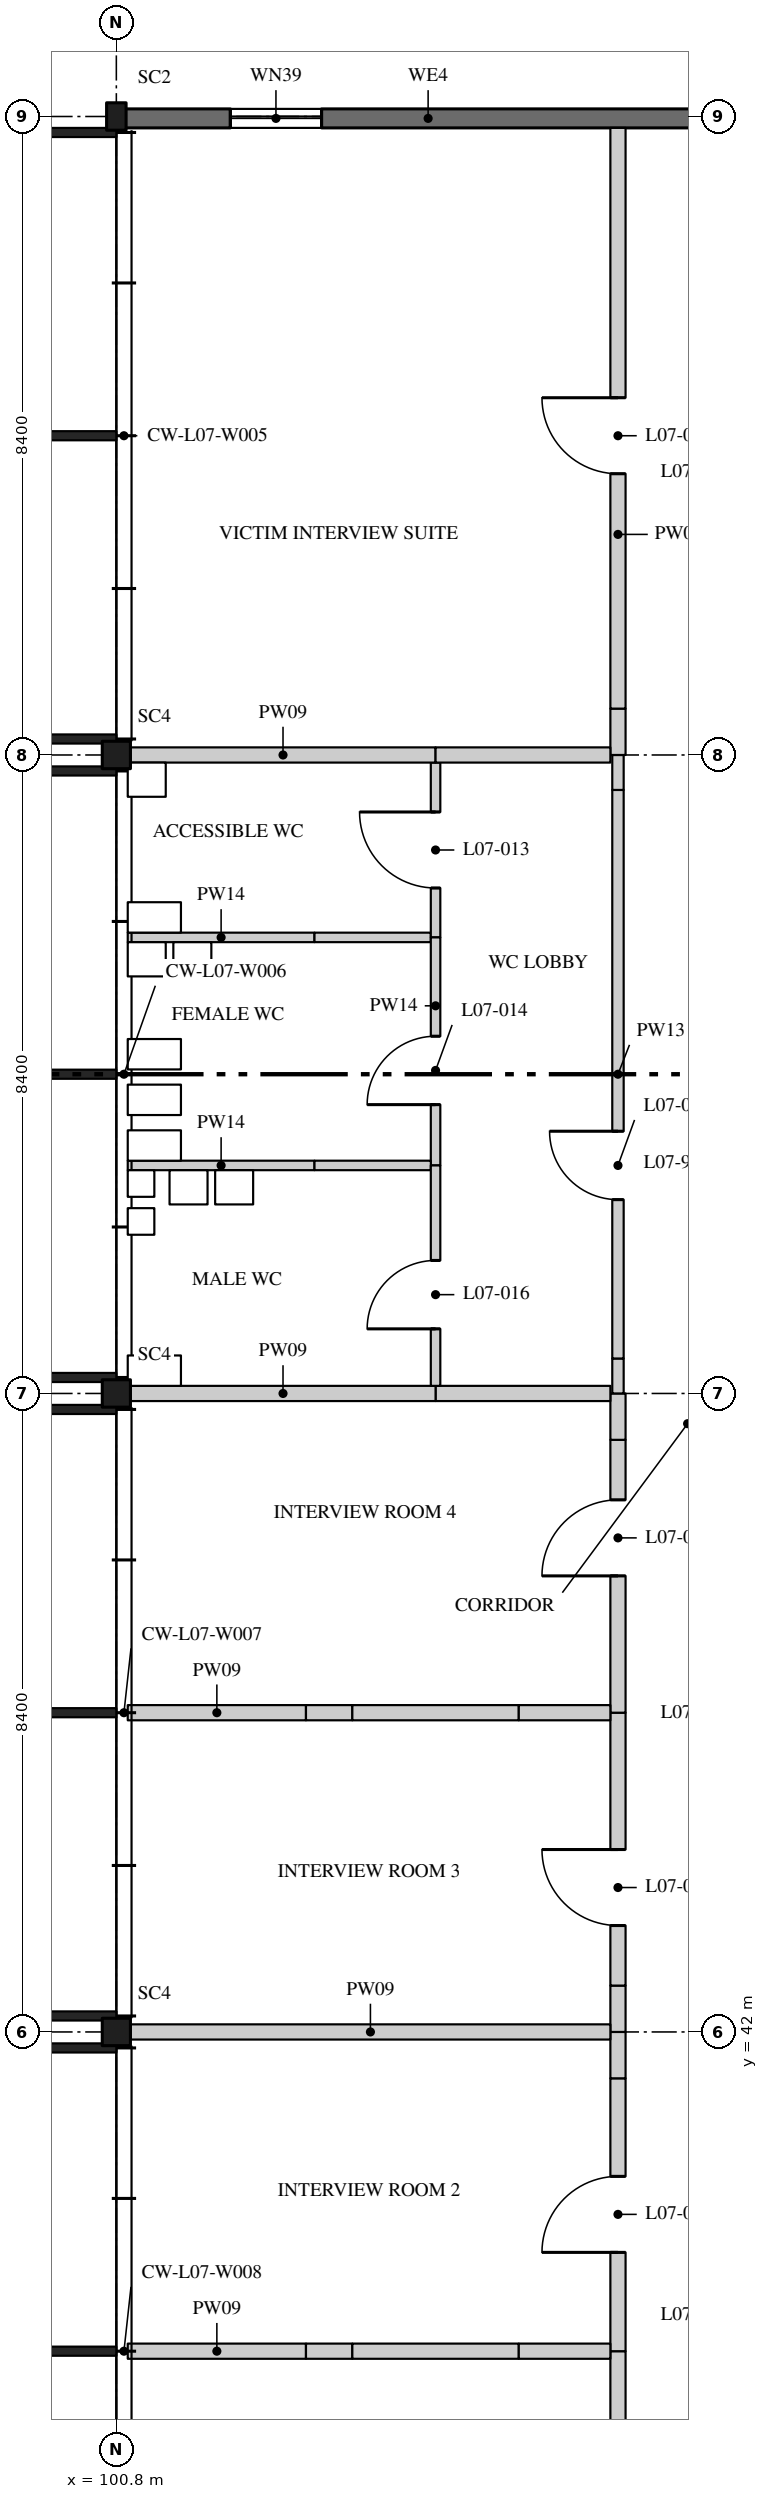
"""IFC4 building model, lengths in metres.
Left out: names, types, materials, properties, quantities, classifications, styles, units other than length and angle.
Written with IfcOpenShell. Run it as: python <this file> out.ifc"""

import sys

from ifc_helpers import new_model, si_unit, direction, frame, frame_2d, origin, origin_2d, place, context, subcontext, project, spatial, rectangle, i_section, extrude, element, fill, save


model = new_model("IFC4")
c1 = context("Model", 3, precision=1e-05, world=origin(), true_north=direction((0.0, 1.0)))
c2 = subcontext(c1, "Body", "Model", "MODEL_VIEW")
j1 = project(units=[si_unit("LENGTHUNIT", "METRE"), si_unit("PLANEANGLEUNIT", "RADIAN")], contexts=[c1])
p1 = place(None, origin())
s1 = spatial("IfcSite", under=j1, at=p1, CompositionType="ELEMENT")
p2 = place(p1, origin())
s2 = spatial("IfcBuilding", under=s1, at=p2, CompositionType="ELEMENT")
p3 = place(p2, frame((0.0, 0.0, 32.4)))
s3 = spatial("IfcBuildingStorey", under=s2, at=p3, CompositionType="ELEMENT", Elevation=32.4)
for number, where, z_axis, x_axis in (
    (1, (100.8, 42.0, 0.0), (0.0, 0.0, 1.0), (1.0, 0.0, 0.0)),
    (2, (100.8, 50.4, 0.0), (0.0, 0.0, 1.0), (1.0, 0.0, 0.0)),
    (3, (100.8, 58.8, 0.0), (0.0, 0.0, 1.0), (1.0, 0.0, 0.0)),
):
    element("IfcColumn", number, at=place(p3, frame(where, z_axis=z_axis, x_axis=x_axis)), inside=s3, PredefinedType="COLUMN", context=c2, shape_type="SweptSolid", body=[
        extrude(i_section(OverallWidth=0.371, OverallDepth=0.361, WebThickness=0.012, FlangeThickness=0.02, FilletRadius=0.015, at=origin_2d()), origin(), (0.0, 0.0, 1.0), 4.37),
    ])
p4 = place(p3, frame((100.8, 67.2, 0.0), z_axis=(0.0, 0.0, 1.0), x_axis=(1.0, 0.0, 0.0)))
e4 = element("IfcColumn", 4, at=p4, inside=s3, PredefinedType="COLUMN", context=c2, shape_type="SweptSolid", body=[
    extrude(i_section(OverallWidth=0.257, OverallDepth=0.361, WebThickness=0.011, FlangeThickness=0.02, FilletRadius=0.015, at=origin_2d()), origin(), (0.0, 0.0, 1.0), 4.37),
])
p5 = place(p3, frame((107.4, 33.75, 0.0), z_axis=(0.0, 0.0, 1.0), x_axis=(0.0, 1.0, 0.0)))
e5 = element("IfcWall", 5, at=p5, inside=s3, PredefinedType="PARTITIONING", context=c2, shape_type="SweptSolid", body=[
    extrude(rectangle(XDim=4.05, YDim=0.2, at=frame_2d((2.025, 0.0))), origin(), (0.0, 0.0, 1.0), 4.37),
])
p6 = place(p5, frame((1.25, 0.0, 0.0)))
e6 = element("IfcOpeningElement", 6, at=p6, cuts=e5, PredefinedType="OPENING", context=c2, shape_type="SweptSolid", body=[
    extrude(rectangle(XDim=1.0, YDim=2.1, at=frame_2d((0.5, 1.05))), frame((0.0, 0.11, 0.0), z_axis=(0.0, -1.0, 0.0), x_axis=(1.0, 0.0, 0.0)), (0.0, 0.0, 1.0), 0.22),
])
p7 = place(p3, frame((107.4, 37.8, 0.0), z_axis=(0.0, 0.0, 1.0), x_axis=(0.0, 1.0, 0.0)))
e7 = element("IfcWall", 7, at=p7, inside=s3, PredefinedType="PARTITIONING", context=c2, shape_type="SweptSolid", body=[
    extrude(rectangle(XDim=3.59, YDim=0.2, at=frame_2d((1.795, 0.0))), origin(), (0.0, 0.0, 1.0), 4.37),
])
p8 = place(p7, frame((1.3, 0.0, 0.0)))
e8 = element("IfcOpeningElement", 8, at=p8, cuts=e7, PredefinedType="OPENING", context=c2, shape_type="SweptSolid", body=[
    extrude(rectangle(XDim=1.0, YDim=2.1, at=frame_2d((0.5, 1.05))), frame((0.0, 0.11, 0.0), z_axis=(0.0, -1.0, 0.0), x_axis=(1.0, 0.0, 0.0)), (0.0, 0.0, 1.0), 0.22),
])
for number, where, z_axis, x_axis in (
    (9, (107.4, 41.39, 0.0), (0.0, 0.0, 1.0), (0.0, 1.0, 0.0)),
    (10, (107.4, 42.0, 0.0), (0.0, 0.0, 1.0), (0.0, 1.0, 0.0)),
):
    element("IfcWall", number, at=place(p3, frame(where, z_axis=z_axis, x_axis=x_axis)), inside=s3, PredefinedType="PARTITIONING", context=c2, shape_type="SweptSolid", body=[
        extrude(rectangle(XDim=0.61, YDim=0.2, at=frame_2d((0.305, 0.0))), origin(), (0.0, 0.0, 1.0), 3.746),
    ])
p9 = place(p3, frame((107.4, 42.61, 0.0), z_axis=(0.0, 0.0, 1.0), x_axis=(0.0, 1.0, 0.0)))
e11 = element("IfcWall", 11, at=p9, inside=s3, PredefinedType="PARTITIONING", context=c2, shape_type="SweptSolid", body=[
    extrude(rectangle(XDim=3.59, YDim=0.2, at=frame_2d((1.795, 0.0))), origin(), (0.0, 0.0, 1.0), 4.37),
])
p10 = place(p9, frame((0.79, 0.0, 0.0)))
e12 = element("IfcOpeningElement", 12, at=p10, cuts=e11, PredefinedType="OPENING", context=c2, shape_type="SweptSolid", body=[
    extrude(rectangle(XDim=1.0, YDim=2.1, at=frame_2d((0.5, 1.05))), frame((0.0, 0.11, 0.0), z_axis=(0.0, -1.0, 0.0), x_axis=(1.0, 0.0, 0.0)), (0.0, 0.0, 1.0), 0.22),
])
p11 = place(p3, frame((107.4, 46.2, 0.0), z_axis=(0.0, 0.0, 1.0), x_axis=(0.0, 1.0, 0.0)))
e13 = element("IfcWall", 13, at=p11, inside=s3, PredefinedType="PARTITIONING", context=c2, shape_type="SweptSolid", body=[
    extrude(rectangle(XDim=3.59, YDim=0.2, at=frame_2d((1.795, 0.0))), origin(), (0.0, 0.0, 1.0), 4.37),
])
p12 = place(p11, frame((1.8, 0.0, 0.0)))
e14 = element("IfcOpeningElement", 14, at=p12, cuts=e13, PredefinedType="OPENING", context=c2, shape_type="SweptSolid", body=[
    extrude(rectangle(XDim=1.0, YDim=2.1, at=frame_2d((0.5, 1.05))), frame((0.0, 0.11, 0.0), z_axis=(0.0, -1.0, 0.0), x_axis=(1.0, 0.0, 0.0)), (0.0, 0.0, 1.0), 0.22),
])
p13 = place(p3, frame((107.4, 49.79, 0.0), z_axis=(0.0, 0.0, 1.0), x_axis=(0.0, 1.0, 0.0)))
e15 = element("IfcWall", 15, at=p13, inside=s3, PredefinedType="PARTITIONING", context=c2, shape_type="SweptSolid", body=[
    extrude(rectangle(XDim=0.61, YDim=0.2, at=frame_2d((0.305, 0.0))), origin(), (0.0, 0.0, 1.0), 3.746),
])
p14 = place(p3, frame((107.4, 50.4, 0.0), z_axis=(0.0, 0.0, 1.0), x_axis=(0.0, 1.0, 0.0)))
e16 = element("IfcWall", 16, at=p14, inside=s3, PredefinedType="PARTITIONING", context=c2, shape_type="SweptSolid", body=[
    extrude(rectangle(XDim=0.46, YDim=0.15, at=frame_2d((0.23, 0.0))), origin(), (0.0, 0.0, 1.0), 3.746),
])
p15 = place(p3, frame((107.4, 50.86, 0.0), z_axis=(0.0, 0.0, 1.0), x_axis=(0.0, 1.0, 0.0)))
e17 = element("IfcWall", 17, at=p15, inside=s3, PredefinedType="PARTITIONING", context=c2, shape_type="SweptSolid", body=[
    extrude(rectangle(XDim=7.48, YDim=0.15, at=frame_2d((3.74, 0.0))), origin(), (0.0, 0.0, 1.0), 4.37),
])
p16 = place(p15, frame((2.09, 0.0, 0.0)))
e18 = element("IfcOpeningElement", 18, at=p16, cuts=e17, PredefinedType="OPENING", context=c2, shape_type="SweptSolid", body=[
    extrude(rectangle(XDim=0.9, YDim=2.1, at=frame_2d((0.45, 1.05))), frame((0.0, 0.085, 0.0), z_axis=(0.0, -1.0, 0.0), x_axis=(1.0, 0.0, 0.0)), (0.0, 0.0, 1.0), 0.17),
])
p17 = place(p3, frame((107.4, 58.34, 0.0), z_axis=(0.0, 0.0, 1.0), x_axis=(0.0, 1.0, 0.0)))
e19 = element("IfcWall", 19, at=p17, inside=s3, PredefinedType="PARTITIONING", context=c2, shape_type="SweptSolid", body=[
    extrude(rectangle(XDim=0.46, YDim=0.15, at=frame_2d((0.23, 0.0))), origin(), (0.0, 0.0, 1.0), 3.746),
])
p18 = place(p3, frame((107.4, 58.8, 0.0), z_axis=(0.0, 0.0, 1.0), x_axis=(0.0, 1.0, 0.0)))
e20 = element("IfcWall", 20, at=p18, inside=s3, PredefinedType="PARTITIONING", context=c2, shape_type="SweptSolid", body=[
    extrude(rectangle(XDim=0.61, YDim=0.2, at=frame_2d((0.305, 0.0))), origin(), (0.0, 0.0, 1.0), 3.746),
])
p19 = place(p3, frame((107.4, 59.41, 0.0), z_axis=(0.0, 0.0, 1.0), x_axis=(0.0, 1.0, 0.0)))
e21 = element("IfcWall", 21, at=p19, inside=s3, PredefinedType="PARTITIONING", context=c2, shape_type="SweptSolid", body=[
    extrude(rectangle(XDim=7.64, YDim=0.2, at=frame_2d((3.82, 0.0))), origin(), (0.0, 0.0, 1.0), 4.37),
])
p20 = place(p19, frame((3.09, 0.0, 0.0)))
e22 = element("IfcOpeningElement", 22, at=p20, cuts=e21, PredefinedType="OPENING", context=c2, shape_type="SweptSolid", body=[
    extrude(rectangle(XDim=1.0, YDim=2.1, at=frame_2d((0.5, 1.05))), frame((0.0, 0.11, 0.0), z_axis=(0.0, -1.0, 0.0), x_axis=(1.0, 0.0, 0.0)), (0.0, 0.0, 1.0), 0.22),
])
p21 = place(p3, frame((100.95, 37.8, 0.0), z_axis=(0.0, 0.0, 1.0), x_axis=(1.0, 0.0, 0.0)))
e23 = element("IfcWall", 23, at=p21, inside=s3, PredefinedType="PARTITIONING", context=c2, shape_type="SweptSolid", body=[
    extrude(rectangle(XDim=2.345, YDim=0.2, at=frame_2d((1.172, 0.0))), origin(), (0.0, 0.0, 1.0), 4.37),
])
p22 = place(p3, frame((103.295, 37.8, 0.0), z_axis=(0.0, 0.0, 1.0), x_axis=(1.0, 0.0, 0.0)))
e24 = element("IfcWall", 24, at=p22, inside=s3, PredefinedType="PARTITIONING", context=c2, shape_type="SweptSolid", body=[
    extrude(rectangle(XDim=0.61, YDim=0.2, at=frame_2d((0.305, 0.0))), origin(), (0.0, 0.0, 1.0), 3.895),
])
p23 = place(p3, frame((103.905, 37.8, 0.0), z_axis=(0.0, 0.0, 1.0), x_axis=(1.0, 0.0, 0.0)))
e25 = element("IfcWall", 25, at=p23, inside=s3, PredefinedType="PARTITIONING", context=c2, shape_type="SweptSolid", body=[
    extrude(rectangle(XDim=2.19, YDim=0.2, at=frame_2d((1.095, 0.0))), origin(), (0.0, 0.0, 1.0), 4.37),
])
p24 = place(p3, frame((106.095, 37.8, 0.0), z_axis=(0.0, 0.0, 1.0), x_axis=(1.0, 0.0, 0.0)))
e26 = element("IfcWall", 26, at=p24, inside=s3, PredefinedType="PARTITIONING", context=c2, shape_type="SweptSolid", body=[
    extrude(rectangle(XDim=1.205, YDim=0.2, at=frame_2d((0.603, 0.0))), origin(), (0.0, 0.0, 1.0), 3.895),
])
p25 = place(p3, frame((100.986, 42.0, 0.0), z_axis=(0.0, 0.0, 1.0), x_axis=(1.0, 0.0, 0.0)))
e27 = element("IfcWall", 27, at=p25, inside=s3, PredefinedType="PARTITIONING", context=c2, shape_type="SweptSolid", body=[
    extrude(rectangle(XDim=6.314, YDim=0.2, at=frame_2d((3.157, 0.0))), origin(), (0.0, 0.0, 1.0), 3.746),
])
p26 = place(p3, frame((100.95, 46.2, 0.0), z_axis=(0.0, 0.0, 1.0), x_axis=(1.0, 0.0, 0.0)))
e28 = element("IfcWall", 28, at=p26, inside=s3, PredefinedType="PARTITIONING", context=c2, shape_type="SweptSolid", body=[
    extrude(rectangle(XDim=2.345, YDim=0.2, at=frame_2d((1.172, 0.0))), origin(), (0.0, 0.0, 1.0), 4.37),
])
p27 = place(p3, frame((103.295, 46.2, 0.0), z_axis=(0.0, 0.0, 1.0), x_axis=(1.0, 0.0, 0.0)))
e29 = element("IfcWall", 29, at=p27, inside=s3, PredefinedType="PARTITIONING", context=c2, shape_type="SweptSolid", body=[
    extrude(rectangle(XDim=0.61, YDim=0.2, at=frame_2d((0.305, 0.0))), origin(), (0.0, 0.0, 1.0), 3.895),
])
p28 = place(p3, frame((103.905, 46.2, 0.0), z_axis=(0.0, 0.0, 1.0), x_axis=(1.0, 0.0, 0.0)))
e30 = element("IfcWall", 30, at=p28, inside=s3, PredefinedType="PARTITIONING", context=c2, shape_type="SweptSolid", body=[
    extrude(rectangle(XDim=2.19, YDim=0.2, at=frame_2d((1.095, 0.0))), origin(), (0.0, 0.0, 1.0), 4.37),
])
p29 = place(p3, frame((106.095, 46.2, 0.0), z_axis=(0.0, 0.0, 1.0), x_axis=(1.0, 0.0, 0.0)))
e31 = element("IfcWall", 31, at=p29, inside=s3, PredefinedType="PARTITIONING", context=c2, shape_type="SweptSolid", body=[
    extrude(rectangle(XDim=1.205, YDim=0.2, at=frame_2d((0.603, 0.0))), origin(), (0.0, 0.0, 1.0), 3.895),
])
p30 = place(p3, frame((105.0, 50.4, 0.0), z_axis=(0.0, 0.0, 1.0), x_axis=(1.0, 0.0, 0.0)))
e32 = element("IfcWall", 32, at=p30, inside=s3, PredefinedType="PARTITIONING", context=c2, shape_type="SweptSolid", body=[
    extrude(rectangle(XDim=2.3, YDim=0.2, at=frame_2d((1.15, 0.0))), origin(), (0.0, 0.0, 1.0), 3.746),
])
p31 = place(p3, frame((100.986, 50.4, 0.0), z_axis=(0.0, 0.0, 1.0), x_axis=(1.0, 0.0, 0.0)))
e33 = element("IfcWall", 33, at=p31, inside=s3, PredefinedType="PARTITIONING", context=c2, shape_type="SweptSolid", body=[
    extrude(rectangle(XDim=4.014, YDim=0.2, at=frame_2d((2.007, 0.0))), origin(), (0.0, 0.0, 1.0), 3.746),
])
p32 = place(p3, frame((100.95, 56.4, 0.0), z_axis=(0.0, 0.0, 1.0), x_axis=(1.0, 0.0, 0.0)))
e34 = element("IfcWall", 34, at=p32, inside=s3, PredefinedType="PARTITIONING", context=c2, shape_type="SweptSolid", body=[
    extrude(rectangle(XDim=2.457, YDim=0.125, at=frame_2d((1.229, 0.0))), origin(), (0.0, 0.0, 1.0), 4.37),
])
p33 = place(p3, frame((103.407, 56.4, 0.0), z_axis=(0.0, 0.0, 1.0), x_axis=(1.0, 0.0, 0.0)))
e35 = element("IfcWall", 35, at=p33, inside=s3, PredefinedType="PARTITIONING", context=c2, shape_type="SweptSolid", body=[
    extrude(rectangle(XDim=1.531, YDim=0.125, at=frame_2d((0.766, 0.0))), origin(), (0.0, 0.0, 1.0), 3.895),
])
p34 = place(p3, frame((105.0, 56.4, 0.0), z_axis=(0.0, 0.0, 1.0), x_axis=(0.0, 1.0, 0.0)))
e36 = element("IfcWall", 36, at=p34, inside=s3, PredefinedType="PARTITIONING", context=c2, shape_type="SweptSolid", body=[
    extrude(rectangle(XDim=2.3, YDim=0.125, at=frame_2d((1.15, 0.0))), origin(), (0.0, 0.0, 1.0), 4.37),
])
p35 = place(p34, frame((0.65, 0.0, 0.0)))
e37 = element("IfcOpeningElement", 37, at=p35, cuts=e36, PredefinedType="OPENING", context=c2, shape_type="SweptSolid", body=[
    extrude(rectangle(XDim=1.0, YDim=2.1, at=frame_2d((0.5, 1.05))), frame((0.0, 0.073, 0.0), z_axis=(0.0, -1.0, 0.0), x_axis=(1.0, 0.0, 0.0)), (0.0, 0.0, 1.0), 0.145),
])
p36 = place(p3, frame((100.986, 58.8, 0.0), z_axis=(0.0, 0.0, 1.0), x_axis=(1.0, 0.0, 0.0)))
e38 = element("IfcWall", 38, at=p36, inside=s3, PredefinedType="PARTITIONING", context=c2, shape_type="SweptSolid", body=[
    extrude(rectangle(XDim=4.014, YDim=0.2, at=frame_2d((2.007, 0.0))), origin(), (0.0, 0.0, 1.0), 3.746),
])
p37 = place(p3, frame((105.0, 53.4, 0.0), z_axis=(0.0, 0.0, 1.0), x_axis=(0.0, 1.0, 0.0)))
e39 = element("IfcWall", 39, at=p37, inside=s3, PredefinedType="PARTITIONING", context=c2, shape_type="SweptSolid", body=[
    extrude(rectangle(XDim=3.0, YDim=0.125, at=frame_2d((1.5, 0.0))), origin(), (0.0, 0.0, 1.0), 4.37),
])
p38 = place(p37, frame((0.8, 0.0, 0.0)))
e40 = element("IfcOpeningElement", 40, at=p38, cuts=e39, PredefinedType="OPENING", context=c2, shape_type="SweptSolid", body=[
    extrude(rectangle(XDim=0.9, YDim=2.1, at=frame_2d((0.45, 1.05))), frame((0.0, 0.073, 0.0), z_axis=(0.0, -1.0, 0.0), x_axis=(1.0, 0.0, 0.0)), (0.0, 0.0, 1.0), 0.145),
])
p39 = place(p3, frame((100.95, 53.4, 0.0), z_axis=(0.0, 0.0, 1.0), x_axis=(1.0, 0.0, 0.0)))
e41 = element("IfcWall", 41, at=p39, inside=s3, PredefinedType="PARTITIONING", context=c2, shape_type="SweptSolid", body=[
    extrude(rectangle(XDim=2.457, YDim=0.125, at=frame_2d((1.229, 0.0))), origin(), (0.0, 0.0, 1.0), 4.37),
])
p40 = place(p3, frame((103.407, 53.4, 0.0), z_axis=(0.0, 0.0, 1.0), x_axis=(1.0, 0.0, 0.0)))
e42 = element("IfcWall", 42, at=p40, inside=s3, PredefinedType="PARTITIONING", context=c2, shape_type="SweptSolid", body=[
    extrude(rectangle(XDim=1.531, YDim=0.125, at=frame_2d((0.766, 0.0))), origin(), (0.0, 0.0, 1.0), 3.895),
])
p41 = place(p3, frame((105.0, 50.5, 0.0), z_axis=(0.0, 0.0, 1.0), x_axis=(0.0, 1.0, 0.0)))
e43 = element("IfcWall", 43, at=p41, inside=s3, PredefinedType="PARTITIONING", context=c2, shape_type="SweptSolid", body=[
    extrude(rectangle(XDim=2.9, YDim=0.125, at=frame_2d((1.45, 0.0))), origin(), (0.0, 0.0, 1.0), 4.37),
])
p42 = place(p41, frame((0.75, 0.0, 0.0)))
e44 = element("IfcOpeningElement", 44, at=p42, cuts=e43, PredefinedType="OPENING", context=c2, shape_type="SweptSolid", body=[
    extrude(rectangle(XDim=0.9, YDim=2.1, at=frame_2d((0.45, 1.05))), frame((0.0, 0.073, 0.0), z_axis=(0.0, -1.0, 0.0), x_axis=(1.0, 0.0, 0.0)), (0.0, 0.0, 1.0), 0.145),
])
p43 = place(p3, frame((105.0, 58.8, 0.0), z_axis=(0.0, 0.0, 1.0), x_axis=(1.0, 0.0, 0.0)))
e45 = element("IfcWall", 45, at=p43, inside=s3, PredefinedType="PARTITIONING", context=c2, shape_type="SweptSolid", body=[
    extrude(rectangle(XDim=2.3, YDim=0.2, at=frame_2d((1.15, 0.0))), origin(), (0.0, 0.0, 1.0), 3.746),
])
p44 = place(p3, frame((109.0, 67.175, 0.0), z_axis=(0.0, 0.0, 1.0), x_axis=(-1.0, 0.0, 0.0)))
e46 = element("IfcWall", 46, at=p44, inside=s3, PredefinedType="SOLIDWALL", context=c2, shape_type="SweptSolid", body=[
    extrude(rectangle(XDim=8.196, YDim=0.25, at=frame_2d((4.098, 0.0))), origin(), (0.0, 0.0, 1.0), 3.746),
])
p45 = place(p44, frame((5.5, 0.0, 2.1)))
e47 = element("IfcOpeningElement", 47, at=p45, cuts=e46, PredefinedType="OPENING", context=c2, shape_type="SweptSolid", body=[
    extrude(rectangle(XDim=1.2, YDim=0.45, at=frame_2d((0.6, 0.225))), frame((0.0, 0.135, 0.0), z_axis=(0.0, -1.0, 0.0), x_axis=(1.0, 0.0, 0.0)), (0.0, 0.0, 1.0), 0.27),
])
p46 = place(p8, origin())
e48 = element("IfcDoor", 48, at=p46, inside=s3, OperationType="SINGLE_SWING_RIGHT", PredefinedType="DOOR", context=c2, shape_type="SweptSolid", body=[
    extrude(rectangle(XDim=1.0, YDim=2.1, at=frame_2d((0.5, 1.05))), frame((0.0, 0.045, 0.0), z_axis=(0.0, -1.0, 0.0), x_axis=(1.0, 0.0, 0.0)), (0.0, 0.0, 1.0), 0.09),
])
fill(e8, e48)
p47 = place(p10, origin())
e49 = element("IfcDoor", 49, at=p47, inside=s3, OperationType="SINGLE_SWING_LEFT", PredefinedType="DOOR", context=c2, shape_type="SweptSolid", body=[
    extrude(rectangle(XDim=1.0, YDim=2.1, at=frame_2d((0.5, 1.05))), frame((0.0, 0.045, 0.0), z_axis=(0.0, -1.0, 0.0), x_axis=(1.0, 0.0, 0.0)), (0.0, 0.0, 1.0), 0.09),
])
fill(e12, e49)
p48 = place(p12, origin())
e50 = element("IfcDoor", 50, at=p48, inside=s3, OperationType="SINGLE_SWING_RIGHT", PredefinedType="DOOR", context=c2, shape_type="SweptSolid", body=[
    extrude(rectangle(XDim=1.0, YDim=2.1, at=frame_2d((0.5, 1.05))), frame((0.0, 0.045, 0.0), z_axis=(0.0, -1.0, 0.0), x_axis=(1.0, 0.0, 0.0)), (0.0, 0.0, 1.0), 0.09),
])
fill(e14, e50)
p49 = place(p35, origin())
e51 = element("IfcDoor", 51, at=p49, inside=s3, OperationType="SINGLE_SWING_LEFT", PredefinedType="DOOR", context=c2, shape_type="SweptSolid", body=[
    extrude(rectangle(XDim=1.0, YDim=2.1, at=frame_2d((0.5, 1.05))), frame((0.0, 0.02, 0.0), z_axis=(0.0, -1.0, 0.0), x_axis=(1.0, 0.0, 0.0)), (0.0, 0.0, 1.0), 0.04),
])
fill(e37, e51)
p50 = place(p38, origin())
e52 = element("IfcDoor", 52, at=p50, inside=s3, OperationType="SINGLE_SWING_RIGHT", PredefinedType="DOOR", context=c2, shape_type="SweptSolid", body=[
    extrude(rectangle(XDim=0.9, YDim=2.1, at=frame_2d((0.45, 1.05))), frame((0.0, 0.02, 0.0), z_axis=(0.0, -1.0, 0.0), x_axis=(1.0, 0.0, 0.0)), (0.0, 0.0, 1.0), 0.04),
])
fill(e40, e52)
p51 = place(p16, origin())
e53 = element("IfcDoor", 53, at=p51, inside=s3, OperationType="SINGLE_SWING_LEFT", PredefinedType="DOOR", context=c2, shape_type="SweptSolid", body=[
    extrude(rectangle(XDim=0.9, YDim=2.1, at=frame_2d((0.45, 1.05))), frame((0.0, 0.025, 0.0), z_axis=(0.0, -1.0, 0.0), x_axis=(1.0, 0.0, 0.0)), (0.0, 0.0, 1.0), 0.05),
])
fill(e18, e53)
p52 = place(p42, origin())
e54 = element("IfcDoor", 54, at=p52, inside=s3, OperationType="SINGLE_SWING_RIGHT", PredefinedType="DOOR", context=c2, shape_type="SweptSolid", body=[
    extrude(rectangle(XDim=0.9, YDim=2.1, at=frame_2d((0.45, 1.05))), frame((0.0, 0.02, 0.0), z_axis=(0.0, -1.0, 0.0), x_axis=(1.0, 0.0, 0.0)), (0.0, 0.0, 1.0), 0.04),
])
fill(e44, e54)
p53 = place(p20, origin())
e55 = element("IfcDoor", 55, at=p53, inside=s3, OperationType="SINGLE_SWING_LEFT", PredefinedType="DOOR", context=c2, shape_type="SweptSolid", body=[
    extrude(rectangle(XDim=1.0, YDim=2.1, at=frame_2d((0.5, 1.05))), frame((0.0, 0.045, 0.0), z_axis=(0.0, -1.0, 0.0), x_axis=(1.0, 0.0, 0.0)), (0.0, 0.0, 1.0), 0.09),
])
fill(e22, e55)
p54 = place(p45, origin())
e56 = element("IfcWindow", 56, at=p54, inside=s3, PartitioningType="SINGLE_PANEL", PredefinedType="WINDOW", context=c2, shape_type="SweptSolid", body=[
    extrude(rectangle(XDim=1.2, YDim=0.45, at=frame_2d((0.6, 0.225))), frame((0.0, 0.05, 0.0), z_axis=(0.0, -1.0, 0.0), x_axis=(1.0, 0.0, 0.0)), (0.0, 0.0, 1.0), 0.1),
])
fill(e47, e56)
save(model, sys.argv[1])
